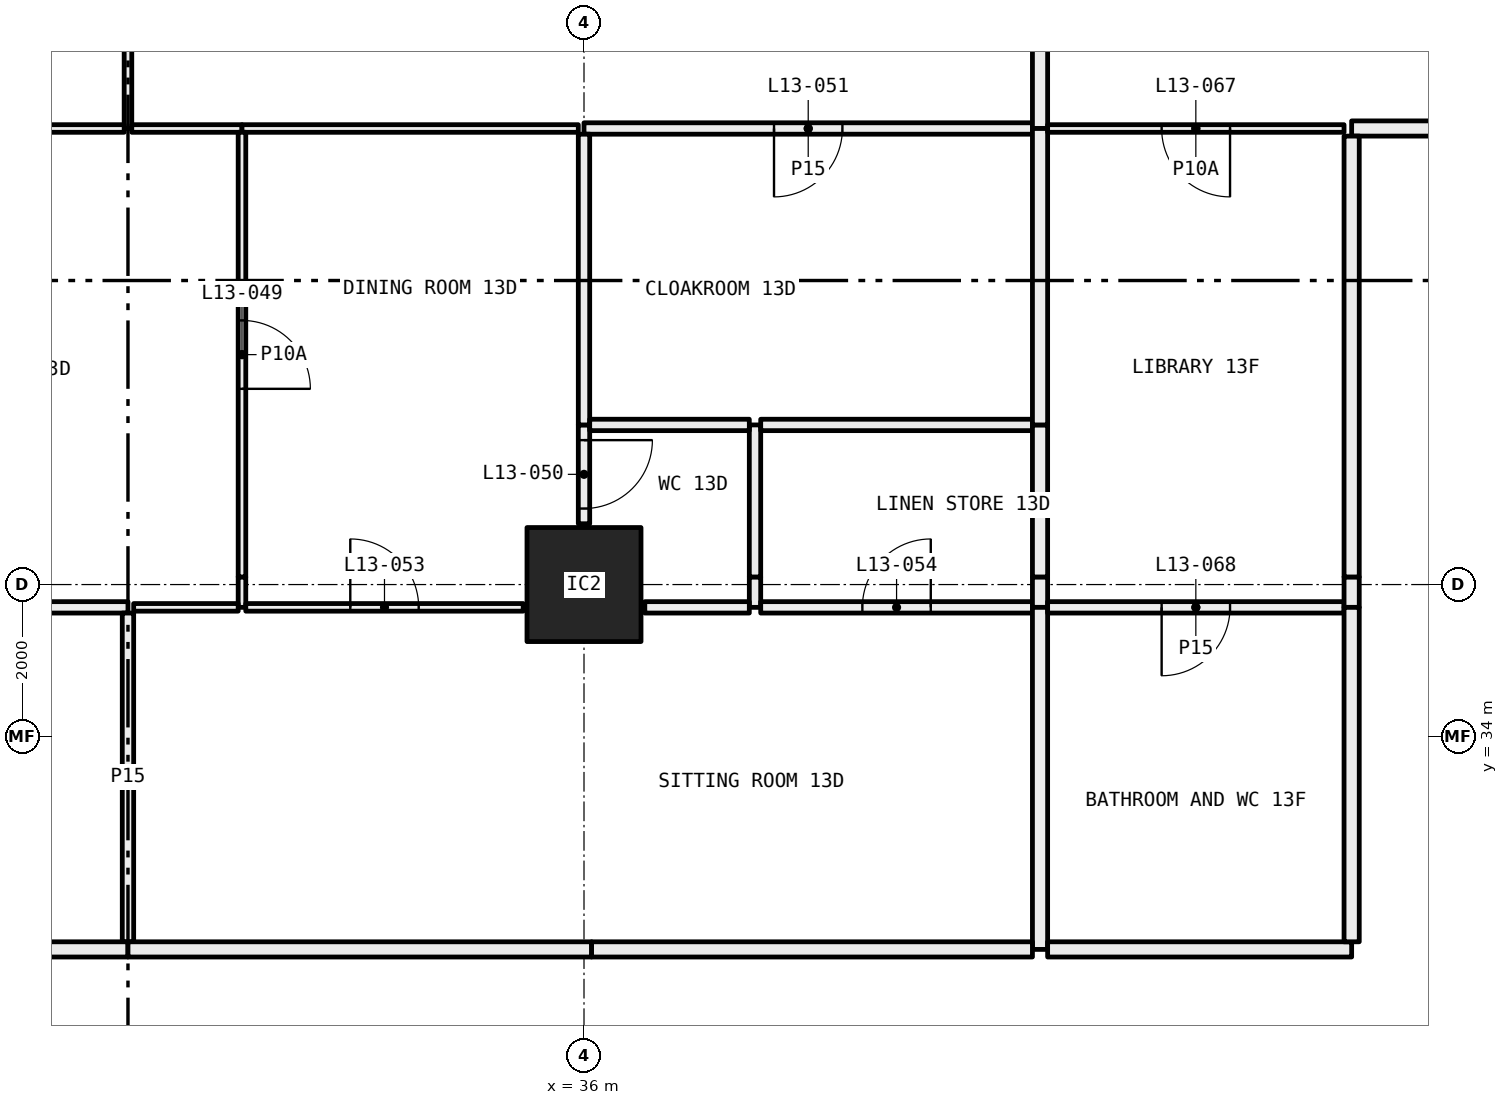
"""IFC4 building model, lengths in metres.
Left out: names, types, materials, properties, quantities, classifications, styles, units other than length and angle.
Written with IfcOpenShell. Run it as: python <this file> out.ifc"""

import sys

from ifc_helpers import new_model, si_unit, direction, frame, frame_2d, origin, origin_2d, place, context, subcontext, project, spatial, rectangle, hollow_rectangle, extrude, element, fill, save


model = new_model("IFC4")
c1 = context("Model", 3, precision=1e-05, world=origin(), true_north=direction((0.0, 1.0)))
c2 = subcontext(c1, "Body", "Model", "MODEL_VIEW")
j1 = project(units=[si_unit("LENGTHUNIT", "METRE"), si_unit("PLANEANGLEUNIT", "RADIAN")], contexts=[c1])
p1 = place(None, origin())
s1 = spatial("IfcSite", under=j1, at=p1, CompositionType="ELEMENT")
p2 = place(p1, origin())
s2 = spatial("IfcBuilding", under=s1, at=p2, CompositionType="ELEMENT")
p3 = place(p2, frame((0.0, 0.0, 57.6)))
s3 = spatial("IfcBuildingStorey", under=s2, at=p3, CompositionType="ELEMENT", Elevation=57.6)
p4 = place(p3, frame((36.0, 36.0, 0.0), z_axis=(0.0, 0.0, 1.0), x_axis=(1.0, 0.0, 0.0)))
e1 = element("IfcColumn", 1, at=p4, inside=s3, PredefinedType="COLUMN", context=c2, shape_type="SweptSolid", body=[
    extrude(hollow_rectangle(XDim=1.5, YDim=1.5, WallThickness=0.065, at=origin_2d()), origin(), (0.0, 0.0, 1.0), 3.05),
])
p5 = place(p3, frame((30.0, 42.0, 0.0), z_axis=(0.0, 0.0, 1.0), x_axis=(0.0, 1.0, 0.0)))
e2 = element("IfcWall", 2, at=p5, inside=s3, PredefinedType="PARTITIONING", context=c2, shape_type="SweptSolid", body=[
    extrude(rectangle(XDim=5.28, YDim=0.1, at=frame_2d((2.64, 0.0))), origin(), (0.0, 0.0, 1.0), 3.05),
])
p6 = place(p5, frame((2.19, 0.0, 0.0)))
e3 = element("IfcOpeningElement", 3, at=p6, cuts=e2, PredefinedType="OPENING", context=c2, shape_type="SweptSolid", body=[
    extrude(rectangle(XDim=0.9, YDim=2.1, at=frame_2d((0.45, 1.05))), frame((0.0, 0.06, 0.0), z_axis=(0.0, -1.0, 0.0), x_axis=(1.0, 0.0, 0.0)), (0.0, 0.0, 1.0), 0.12),
])
p7 = place(p3, frame((26.0, 42.0, 0.0), z_axis=(0.0, 0.0, 1.0), x_axis=(1.0, 0.0, 0.0)))
e4 = element("IfcWall", 4, at=p7, inside=s3, PredefinedType="PARTITIONING", context=c2, shape_type="SweptSolid", body=[
    extrude(rectangle(XDim=3.95, YDim=0.1, at=frame_2d((1.975, 0.0))), origin(), (0.0, 0.0, 1.0), 3.05),
])
p8 = place(p7, frame((1.525, 0.0, 0.0)))
e5 = element("IfcOpeningElement", 5, at=p8, cuts=e4, PredefinedType="OPENING", context=c2, shape_type="SweptSolid", body=[
    extrude(rectangle(XDim=0.9, YDim=2.1, at=frame_2d((0.45, 1.05))), frame((0.0, 0.06, 0.0), z_axis=(0.0, -1.0, 0.0), x_axis=(1.0, 0.0, 0.0)), (0.0, 0.0, 1.0), 0.12),
])
p9 = place(p3, frame((30.05, 42.0, 0.0), z_axis=(0.0, 0.0, 1.0), x_axis=(1.0, 0.0, 0.0)))
e6 = element("IfcWall", 6, at=p9, inside=s3, PredefinedType="PARTITIONING", context=c2, shape_type="SweptSolid", body=[
    extrude(rectangle(XDim=1.45, YDim=0.1, at=frame_2d((0.725, 0.0))), origin(), (0.0, 0.0, 1.0), 3.05),
])
p10 = place(p3, frame((31.5, 42.0, 0.0), z_axis=(0.0, 0.0, 1.0), x_axis=(1.0, 0.0, 0.0)))
e7 = element("IfcWall", 7, at=p10, inside=s3, PredefinedType="PARTITIONING", context=c2, shape_type="SweptSolid", body=[
    extrude(rectangle(XDim=4.425, YDim=0.1, at=frame_2d((2.212, 0.0))), origin(), (0.0, 0.0, 1.0), 2.45),
])
p11 = place(p3, frame((36.0, 42.0, 0.0), z_axis=(0.0, 0.0, 1.0), x_axis=(1.0, 0.0, 0.0)))
e8 = element("IfcWall", 8, at=p11, inside=s3, PredefinedType="PARTITIONING", context=c2, shape_type="SweptSolid", body=[
    extrude(rectangle(XDim=5.9, YDim=0.15, at=frame_2d((2.95, 0.0))), origin(), (0.0, 0.0, 1.0), 2.45),
])
p12 = place(p11, frame((2.5, 0.0, 0.0)))
e9 = element("IfcOpeningElement", 9, at=p12, cuts=e8, PredefinedType="OPENING", context=c2, shape_type="SweptSolid", body=[
    extrude(rectangle(XDim=0.9, YDim=2.1, at=frame_2d((0.45, 1.05))), frame((0.0, 0.085, 0.0), z_axis=(0.0, -1.0, 0.0), x_axis=(1.0, 0.0, 0.0)), (0.0, 0.0, 1.0), 0.17),
])
p13 = place(p3, frame((42.0, 42.0, 0.0), z_axis=(0.0, 0.0, 1.0), x_axis=(0.0, 1.0, 0.0)))
e10 = element("IfcWall", 10, at=p13, inside=s3, PredefinedType="PARTITIONING", context=c2, shape_type="SweptSolid", body=[
    extrude(rectangle(XDim=5.28, YDim=0.2, at=frame_2d((2.64, 0.0))), origin(), (0.0, 0.0, 1.0), 3.05),
])
p14 = place(p3, frame((31.5, 35.7, 0.0), z_axis=(0.0, 0.0, 1.0), x_axis=(0.0, 1.0, 0.0)))
e11 = element("IfcWall", 11, at=p14, inside=s3, PredefinedType="PARTITIONING", context=c2, shape_type="SweptSolid", body=[
    extrude(rectangle(XDim=0.4, YDim=0.1, at=frame_2d((0.2, 0.0))), origin(), (0.0, 0.0, 1.0), 2.45),
])
p15 = place(p3, frame((31.5, 36.1, 0.0), z_axis=(0.0, 0.0, 1.0), x_axis=(0.0, 1.0, 0.0)))
e12 = element("IfcWall", 12, at=p15, inside=s3, PredefinedType="PARTITIONING", context=c2, shape_type="SweptSolid", body=[
    extrude(rectangle(XDim=5.85, YDim=0.1, at=frame_2d((2.925, 0.0))), origin(), (0.0, 0.0, 1.0), 3.05),
])
p16 = place(p15, frame((2.475, 0.0, 0.0)))
e13 = element("IfcOpeningElement", 13, at=p16, cuts=e12, PredefinedType="OPENING", context=c2, shape_type="SweptSolid", body=[
    extrude(rectangle(XDim=0.9, YDim=2.1, at=frame_2d((0.45, 1.05))), frame((0.0, 0.06, 0.0), z_axis=(0.0, -1.0, 0.0), x_axis=(1.0, 0.0, 0.0)), (0.0, 0.0, 1.0), 0.12),
])
p17 = place(p3, frame((26.0, 35.7, 0.0), z_axis=(0.0, 0.0, 1.0), x_axis=(1.0, 0.0, 0.0)))
e14 = element("IfcWall", 14, at=p17, inside=s3, PredefinedType="PARTITIONING", context=c2, shape_type="SweptSolid", body=[
    extrude(rectangle(XDim=4.0, YDim=0.15, at=frame_2d((2.0, 0.0))), origin(), (0.0, 0.0, 1.0), 3.05),
])
p18 = place(p17, frame((1.55, 0.0, 0.0)))
e15 = element("IfcOpeningElement", 15, at=p18, cuts=e14, PredefinedType="OPENING", context=c2, shape_type="SweptSolid", body=[
    extrude(rectangle(XDim=0.9, YDim=2.1, at=frame_2d((0.45, 1.05))), frame((0.0, 0.085, 0.0), z_axis=(0.0, -1.0, 0.0), x_axis=(1.0, 0.0, 0.0)), (0.0, 0.0, 1.0), 0.17),
])
p19 = place(p3, frame((30.075, 35.7, 0.0), z_axis=(0.0, 0.0, 1.0), x_axis=(1.0, 0.0, 0.0)))
e16 = element("IfcWall", 16, at=p19, inside=s3, PredefinedType="PARTITIONING", context=c2, shape_type="SweptSolid", body=[
    extrude(rectangle(XDim=1.375, YDim=0.1, at=frame_2d((0.688, 0.0))), origin(), (0.0, 0.0, 1.0), 3.05),
])
p20 = place(p3, frame((36.0, 36.8, 0.0), z_axis=(0.0, 0.0, 1.0), x_axis=(0.0, 1.0, 0.0)))
e17 = element("IfcWall", 17, at=p20, inside=s3, PredefinedType="PARTITIONING", context=c2, shape_type="SweptSolid", body=[
    extrude(rectangle(XDim=1.3, YDim=0.15, at=frame_2d((0.65, 0.0))), origin(), (0.0, 0.0, 1.0), 2.45),
])
p21 = place(p20, frame((0.2, 0.0, 0.0)))
e18 = element("IfcOpeningElement", 18, at=p21, cuts=e17, PredefinedType="OPENING", context=c2, shape_type="SweptSolid", body=[
    extrude(rectangle(XDim=0.9, YDim=2.1, at=frame_2d((0.45, 1.05))), frame((0.0, 0.085, 0.0), z_axis=(0.0, -1.0, 0.0), x_axis=(1.0, 0.0, 0.0)), (0.0, 0.0, 1.0), 0.17),
])
p22 = place(p3, frame((36.0, 38.1, 0.0), z_axis=(0.0, 0.0, 1.0), x_axis=(0.0, 1.0, 0.0)))
e19 = element("IfcWall", 19, at=p22, inside=s3, PredefinedType="PARTITIONING", context=c2, shape_type="SweptSolid", body=[
    extrude(rectangle(XDim=3.825, YDim=0.15, at=frame_2d((1.913, 0.0))), origin(), (0.0, 0.0, 1.0), 2.45),
])
p23 = place(p3, frame((31.55, 35.7, 0.0), z_axis=(0.0, 0.0, 1.0), x_axis=(1.0, 0.0, 0.0)))
e20 = element("IfcWall", 20, at=p23, inside=s3, PredefinedType="PARTITIONING", context=c2, shape_type="SweptSolid", body=[
    extrude(rectangle(XDim=3.65, YDim=0.1, at=frame_2d((1.825, 0.0))), origin(), (0.0, 0.0, 1.0), 3.05),
])
p24 = place(p23, frame((1.375, 0.0, 0.0)))
e21 = element("IfcOpeningElement", 21, at=p24, cuts=e20, PredefinedType="OPENING", context=c2, shape_type="SweptSolid", body=[
    extrude(rectangle(XDim=0.9, YDim=2.1, at=frame_2d((0.45, 1.05))), frame((0.0, 0.06, 0.0), z_axis=(0.0, -1.0, 0.0), x_axis=(1.0, 0.0, 0.0)), (0.0, 0.0, 1.0), 0.12),
])
p25 = place(p3, frame((38.25, 35.7, 0.0), z_axis=(0.0, 0.0, 1.0), x_axis=(0.0, 1.0, 0.0)))
e22 = element("IfcWall", 22, at=p25, inside=s3, PredefinedType="PARTITIONING", context=c2, shape_type="SweptSolid", body=[
    extrude(rectangle(XDim=0.4, YDim=0.15, at=frame_2d((0.2, 0.0))), origin(), (0.0, 0.0, 1.0), 2.45),
])
p26 = place(p3, frame((38.25, 36.1, 0.0), z_axis=(0.0, 0.0, 1.0), x_axis=(0.0, 1.0, 0.0)))
e23 = element("IfcWall", 23, at=p26, inside=s3, PredefinedType="PARTITIONING", context=c2, shape_type="SweptSolid", body=[
    extrude(rectangle(XDim=2.0, YDim=0.15, at=frame_2d((1.0, 0.0))), origin(), (0.0, 0.0, 1.0), 3.05),
])
p27 = place(p3, frame((38.175, 38.1, 0.0), z_axis=(0.0, 0.0, 1.0), x_axis=(-1.0, 0.0, 0.0)))
e24 = element("IfcWall", 24, at=p27, inside=s3, PredefinedType="PARTITIONING", context=c2, shape_type="SweptSolid", body=[
    extrude(rectangle(XDim=2.1, YDim=0.15, at=frame_2d((1.05, 0.0))), origin(), (0.0, 0.0, 1.0), 2.45),
])
p28 = place(p3, frame((36.8, 35.7, 0.0), z_axis=(0.0, 0.0, 1.0), x_axis=(1.0, 0.0, 0.0)))
e25 = element("IfcWall", 25, at=p28, inside=s3, PredefinedType="PARTITIONING", context=c2, shape_type="SweptSolid", body=[
    extrude(rectangle(XDim=1.375, YDim=0.15, at=frame_2d((0.688, 0.0))), origin(), (0.0, 0.0, 1.0), 3.05),
])
p29 = place(p3, frame((41.9, 38.1, 0.0), z_axis=(0.0, 0.0, 1.0), x_axis=(-1.0, 0.0, 0.0)))
e26 = element("IfcWall", 26, at=p29, inside=s3, PredefinedType="PARTITIONING", context=c2, shape_type="SweptSolid", body=[
    extrude(rectangle(XDim=3.575, YDim=0.15, at=frame_2d((1.788, 0.0))), origin(), (0.0, 0.0, 1.0), 3.05),
])
p30 = place(p3, frame((38.325, 35.7, 0.0), z_axis=(0.0, 0.0, 1.0), x_axis=(1.0, 0.0, 0.0)))
e27 = element("IfcWall", 27, at=p30, inside=s3, PredefinedType="PARTITIONING", context=c2, shape_type="SweptSolid", body=[
    extrude(rectangle(XDim=3.575, YDim=0.15, at=frame_2d((1.788, 0.0))), origin(), (0.0, 0.0, 1.0), 3.05),
])
p31 = place(p30, frame((1.337, 0.0, 0.0)))
e28 = element("IfcOpeningElement", 28, at=p31, cuts=e27, PredefinedType="OPENING", context=c2, shape_type="SweptSolid", body=[
    extrude(rectangle(XDim=0.9, YDim=2.1, at=frame_2d((0.45, 1.05))), frame((0.0, 0.085, 0.0), z_axis=(0.0, -1.0, 0.0), x_axis=(1.0, 0.0, 0.0)), (0.0, 0.0, 1.0), 0.17),
])
p32 = place(p3, frame((42.0, 35.7, 0.0), z_axis=(0.0, 0.0, 1.0), x_axis=(0.0, 1.0, 0.0)))
e29 = element("IfcWall", 29, at=p32, inside=s3, PredefinedType="PARTITIONING", context=c2, shape_type="SweptSolid", body=[
    extrude(rectangle(XDim=0.4, YDim=0.2, at=frame_2d((0.2, 0.0))), origin(), (0.0, 0.0, 1.0), 2.45),
])
p33 = place(p3, frame((42.0, 36.1, 0.0), z_axis=(0.0, 0.0, 1.0), x_axis=(0.0, 1.0, 0.0)))
e30 = element("IfcWall", 30, at=p33, inside=s3, PredefinedType="PARTITIONING", context=c2, shape_type="SweptSolid", body=[
    extrude(rectangle(XDim=2.0, YDim=0.2, at=frame_2d((1.0, 0.0))), origin(), (0.0, 0.0, 1.0), 3.05),
])
p34 = place(p3, frame((42.0, 38.1, 0.0), z_axis=(0.0, 0.0, 1.0), x_axis=(0.0, 1.0, 0.0)))
e31 = element("IfcWall", 31, at=p34, inside=s3, PredefinedType="PARTITIONING", context=c2, shape_type="SweptSolid", body=[
    extrude(rectangle(XDim=3.9, YDim=0.2, at=frame_2d((1.95, 0.0))), origin(), (0.0, 0.0, 1.0), 3.05),
])
p35 = place(p3, frame((30.0, 31.3, 0.0), z_axis=(0.0, 0.0, 1.0), x_axis=(0.0, 1.0, 0.0)))
e32 = element("IfcWall", 32, at=p35, inside=s3, PredefinedType="PARTITIONING", context=c2, shape_type="SweptSolid", body=[
    extrude(rectangle(XDim=4.325, YDim=0.15, at=frame_2d((2.163, 0.0))), origin(), (0.0, 0.0, 1.0), 3.05),
])
p36 = place(p3, frame((26.0, 31.2, 0.0), z_axis=(0.0, 0.0, 1.0), x_axis=(1.0, 0.0, 0.0)))
e33 = element("IfcWall", 33, at=p36, inside=s3, PredefinedType="PARTITIONING", context=c2, shape_type="SweptSolid", body=[
    extrude(rectangle(XDim=4.0, YDim=0.2, at=frame_2d((2.0, 0.0))), origin(), (0.0, 0.0, 1.0), 3.05),
])
p37 = place(p3, frame((42.0, 31.2, 0.0), z_axis=(0.0, 0.0, 1.0), x_axis=(0.0, 1.0, 0.0)))
e34 = element("IfcWall", 34, at=p37, inside=s3, PredefinedType="PARTITIONING", context=c2, shape_type="SweptSolid", body=[
    extrude(rectangle(XDim=4.5, YDim=0.2, at=frame_2d((2.25, 0.0))), origin(), (0.0, 0.0, 1.0), 3.05),
])
p38 = place(p3, frame((30.0, 31.2, 0.0), z_axis=(0.0, 0.0, 1.0), x_axis=(1.0, 0.0, 0.0)))
e35 = element("IfcWall", 35, at=p38, inside=s3, PredefinedType="PARTITIONING", context=c2, shape_type="SweptSolid", body=[
    extrude(rectangle(XDim=6.1, YDim=0.2, at=frame_2d((3.05, 0.0))), origin(), (0.0, 0.0, 1.0), 2.45),
])
p39 = place(p3, frame((36.1, 31.2, 0.0), z_axis=(0.0, 0.0, 1.0), x_axis=(1.0, 0.0, 0.0)))
e36 = element("IfcWall", 36, at=p39, inside=s3, PredefinedType="PARTITIONING", context=c2, shape_type="SweptSolid", body=[
    extrude(rectangle(XDim=5.8, YDim=0.2, at=frame_2d((2.9, 0.0))), origin(), (0.0, 0.0, 1.0), 3.05),
])
p40 = place(p3, frame((42.1, 42.0, 0.0), z_axis=(0.0, 0.0, 1.0), x_axis=(1.0, 0.0, 0.0)))
e37 = element("IfcWall", 37, at=p40, inside=s3, PredefinedType="PARTITIONING", context=c2, shape_type="SweptSolid", body=[
    extrude(rectangle(XDim=3.9, YDim=0.1, at=frame_2d((1.95, 0.0))), origin(), (0.0, 0.0, 1.0), 3.05),
])
p41 = place(p40, frame((1.5, 0.0, 0.0)))
e38 = element("IfcOpeningElement", 38, at=p41, cuts=e37, PredefinedType="OPENING", context=c2, shape_type="SweptSolid", body=[
    extrude(rectangle(XDim=0.9, YDim=2.1, at=frame_2d((0.45, 1.05))), frame((0.0, 0.06, 0.0), z_axis=(0.0, -1.0, 0.0), x_axis=(1.0, 0.0, 0.0)), (0.0, 0.0, 1.0), 0.12),
])
p42 = place(p3, frame((46.1, 42.0, 0.0), z_axis=(0.0, 0.0, 1.0), x_axis=(1.0, 0.0, 0.0)))
e39 = element("IfcWall", 39, at=p42, inside=s3, PredefinedType="PARTITIONING", context=c2, shape_type="SweptSolid", body=[
    extrude(rectangle(XDim=1.9, YDim=0.2, at=frame_2d((0.95, 0.0))), origin(), (0.0, 0.0, 1.0), 3.05),
])
p43 = place(p3, frame((42.1, 35.7, 0.0), z_axis=(0.0, 0.0, 1.0), x_axis=(1.0, 0.0, 0.0)))
e40 = element("IfcWall", 40, at=p43, inside=s3, PredefinedType="PARTITIONING", context=c2, shape_type="SweptSolid", body=[
    extrude(rectangle(XDim=3.9, YDim=0.15, at=frame_2d((1.95, 0.0))), origin(), (0.0, 0.0, 1.0), 3.05),
])
p44 = place(p43, frame((1.5, 0.0, 0.0)))
e41 = element("IfcOpeningElement", 41, at=p44, cuts=e40, PredefinedType="OPENING", context=c2, shape_type="SweptSolid", body=[
    extrude(rectangle(XDim=0.9, YDim=2.1, at=frame_2d((0.45, 1.05))), frame((0.0, 0.085, 0.0), z_axis=(0.0, -1.0, 0.0), x_axis=(1.0, 0.0, 0.0)), (0.0, 0.0, 1.0), 0.17),
])
p45 = place(p3, frame((46.1, 35.7, 0.0), z_axis=(0.0, 0.0, 1.0), x_axis=(0.0, 1.0, 0.0)))
e42 = element("IfcWall", 42, at=p45, inside=s3, PredefinedType="PARTITIONING", context=c2, shape_type="SweptSolid", body=[
    extrude(rectangle(XDim=0.4, YDim=0.2, at=frame_2d((0.2, 0.0))), origin(), (0.0, 0.0, 1.0), 2.45),
])
p46 = place(p3, frame((46.1, 36.1, 0.0), z_axis=(0.0, 0.0, 1.0), x_axis=(0.0, 1.0, 0.0)))
e43 = element("IfcWall", 43, at=p46, inside=s3, PredefinedType="PARTITIONING", context=c2, shape_type="SweptSolid", body=[
    extrude(rectangle(XDim=5.8, YDim=0.2, at=frame_2d((2.9, 0.0))), origin(), (0.0, 0.0, 1.0), 3.05),
])
p47 = place(p3, frame((42.1, 31.2, 0.0), z_axis=(0.0, 0.0, 1.0), x_axis=(1.0, 0.0, 0.0)))
e44 = element("IfcWall", 44, at=p47, inside=s3, PredefinedType="PARTITIONING", context=c2, shape_type="SweptSolid", body=[
    extrude(rectangle(XDim=4.0, YDim=0.2, at=frame_2d((2.0, 0.0))), origin(), (0.0, 0.0, 1.0), 3.05),
])
p48 = place(p3, frame((46.1, 31.3, 0.0), z_axis=(0.0, 0.0, 1.0), x_axis=(0.0, 1.0, 0.0)))
e45 = element("IfcWall", 45, at=p48, inside=s3, PredefinedType="PARTITIONING", context=c2, shape_type="SweptSolid", body=[
    extrude(rectangle(XDim=4.4, YDim=0.2, at=frame_2d((2.2, 0.0))), origin(), (0.0, 0.0, 1.0), 3.05),
])
p49 = place(p16, frame((0.9, 0.0, 0.0), x_axis=(-1.0, 0.0, 0.0)))
e46 = element("IfcDoor", 46, at=p49, inside=s3, OperationType="SINGLE_SWING_LEFT", PredefinedType="DOOR", context=c2, shape_type="SweptSolid", body=[
    extrude(rectangle(XDim=0.9, YDim=2.1, at=frame_2d((0.45, 1.05))), frame((0.0, 0.025, 0.0), z_axis=(0.0, -1.0, 0.0), x_axis=(1.0, 0.0, 0.0)), (0.0, 0.0, 1.0), 0.05),
])
fill(e13, e46)
p50 = place(p21, frame((0.9, 0.0, 0.0), x_axis=(-1.0, 0.0, 0.0)))
e47 = element("IfcDoor", 47, at=p50, inside=s3, OperationType="SINGLE_SWING_RIGHT", PredefinedType="DOOR", context=c2, shape_type="SweptSolid", body=[
    extrude(rectangle(XDim=0.9, YDim=2.1, at=frame_2d((0.45, 1.05))), frame((0.0, 0.025, 0.0), z_axis=(0.0, -1.0, 0.0), x_axis=(1.0, 0.0, 0.0)), (0.0, 0.0, 1.0), 0.05),
])
fill(e18, e47)
p51 = place(p12, frame((0.9, 0.0, 0.0), x_axis=(-1.0, 0.0, 0.0)))
e48 = element("IfcDoor", 48, at=p51, inside=s3, OperationType="SINGLE_SWING_LEFT", PredefinedType="DOOR", context=c2, shape_type="SweptSolid", body=[
    extrude(rectangle(XDim=0.9, YDim=2.1, at=frame_2d((0.45, 1.05))), frame((0.0, 0.025, 0.0), z_axis=(0.0, -1.0, 0.0), x_axis=(1.0, 0.0, 0.0)), (0.0, 0.0, 1.0), 0.05),
])
fill(e9, e48)
p52 = place(p24, origin())
e49 = element("IfcDoor", 49, at=p52, inside=s3, OperationType="SINGLE_SWING_RIGHT", PredefinedType="DOOR", context=c2, shape_type="SweptSolid", body=[
    extrude(rectangle(XDim=0.9, YDim=2.1, at=frame_2d((0.45, 1.05))), frame((0.0, 0.025, 0.0), z_axis=(0.0, -1.0, 0.0), x_axis=(1.0, 0.0, 0.0)), (0.0, 0.0, 1.0), 0.05),
])
fill(e21, e49)
p53 = place(p31, origin())
e50 = element("IfcDoor", 50, at=p53, inside=s3, OperationType="SINGLE_SWING_LEFT", PredefinedType="DOOR", context=c2, shape_type="SweptSolid", body=[
    extrude(rectangle(XDim=0.9, YDim=2.1, at=frame_2d((0.45, 1.05))), frame((0.0, 0.025, 0.0), z_axis=(0.0, -1.0, 0.0), x_axis=(1.0, 0.0, 0.0)), (0.0, 0.0, 1.0), 0.05),
])
fill(e28, e50)
p54 = place(p41, frame((0.9, 0.0, 0.0), x_axis=(-1.0, 0.0, 0.0)))
e51 = element("IfcDoor", 51, at=p54, inside=s3, OperationType="SINGLE_SWING_RIGHT", PredefinedType="DOOR", context=c2, shape_type="SweptSolid", body=[
    extrude(rectangle(XDim=0.9, YDim=2.1, at=frame_2d((0.45, 1.05))), frame((0.0, 0.025, 0.0), z_axis=(0.0, -1.0, 0.0), x_axis=(1.0, 0.0, 0.0)), (0.0, 0.0, 1.0), 0.05),
])
fill(e38, e51)
p55 = place(p44, frame((0.9, 0.0, 0.0), x_axis=(-1.0, 0.0, 0.0)))
e52 = element("IfcDoor", 52, at=p55, inside=s3, OperationType="SINGLE_SWING_LEFT", PredefinedType="DOOR", context=c2, shape_type="SweptSolid", body=[
    extrude(rectangle(XDim=0.9, YDim=2.1, at=frame_2d((0.45, 1.05))), frame((0.0, 0.025, 0.0), z_axis=(0.0, -1.0, 0.0), x_axis=(1.0, 0.0, 0.0)), (0.0, 0.0, 1.0), 0.05),
])
fill(e41, e52)
save(model, sys.argv[1])
